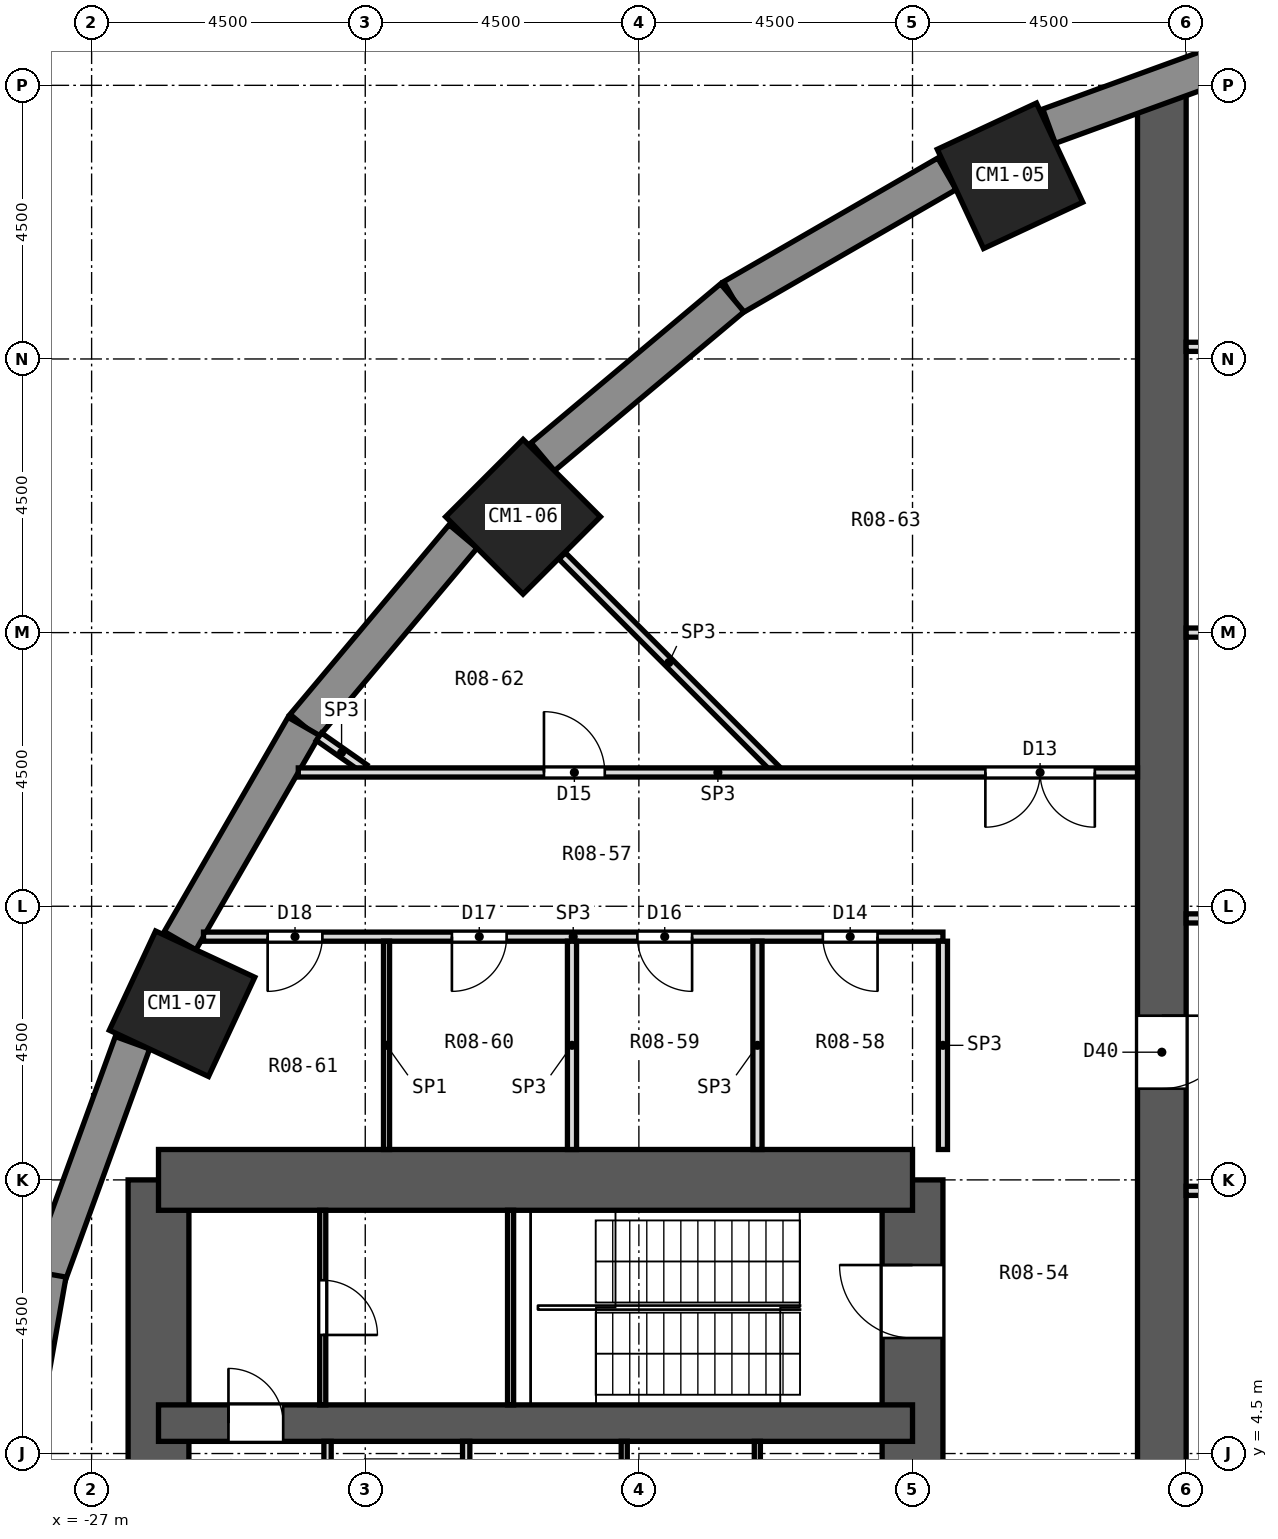
"""IFC4 building model, lengths in metres.
Left out: names, types, materials, properties, quantities, classifications, styles, units other than length and angle.
Written with IfcOpenShell. Run it as: python <this file> out.ifc"""

import sys

from ifc_helpers import new_model, si_unit, direction, frame, frame_2d, origin, origin_2d, place, context, subcontext, project, spatial, rectangle, extrude, element, fill, save


model = new_model("IFC4")
c1 = context("Model", 3, precision=1e-05, world=origin(), true_north=direction((0.0, 1.0)))
c2 = subcontext(c1, "Body", "Model", "MODEL_VIEW")
j1 = project(units=[si_unit("LENGTHUNIT", "METRE"), si_unit("PLANEANGLEUNIT", "RADIAN")], contexts=[c1])
p1 = place(None, origin())
s1 = spatial("IfcSite", under=j1, at=p1, CompositionType="ELEMENT")
p2 = place(p1, origin())
s2 = spatial("IfcBuilding", under=s1, at=p2, CompositionType="ELEMENT")
p3 = place(p2, frame((0.0, 0.0, 21.8)))
s3 = spatial("IfcBuildingStorey", under=s2, at=p3, CompositionType="ELEMENT", Elevation=21.8)
for number, where, z_axis, x_axis in (
    (1, (-11.897, 25.512, 0.0), (0.0, 0.0, 1.0), (-0.423, 0.906, 0.0)),
    (2, (-19.905, 19.905, 0.0), (0.0, 0.0, 1.0), (-0.707, 0.707, 0.0)),
    (3, (-25.512, 11.897, 0.0), (0.0, 0.0, 1.0), (-0.906, 0.423, 0.0)),
):
    element("IfcColumn", number, at=place(p3, frame(where, z_axis=z_axis, x_axis=x_axis)), inside=s3, PredefinedType="COLUMN", context=c2, shape_type="SweptSolid", body=[
        extrude(rectangle(XDim=1.8, YDim=1.8, at=origin_2d()), origin(), (0.0, 0.0, 1.0), 4.5),
    ])
p4 = place(p3, frame((-13.5, -9.0, 0.0), z_axis=(0.0, 0.0, 1.0), x_axis=(0.0, 1.0, 0.0)))
e4 = element("IfcWall", 4, at=p4, inside=s3, PredefinedType="SHEAR", context=c2, shape_type="SweptSolid", body=[
    extrude(rectangle(XDim=18.0, YDim=1.0, at=frame_2d((9.0, 0.0))), origin(), (0.0, 0.0, 1.0), 4.5),
])
p5 = place(p4, frame((15.4, 0.0, 0.0)))
e5 = element("IfcOpeningElement", 5, at=p5, cuts=e4, PredefinedType="OPENING", context=c2, shape_type="SweptSolid", body=[
    extrude(rectangle(XDim=1.2, YDim=2.1, at=frame_2d((0.6, 1.05))), frame((0.0, 0.512, 0.0), z_axis=(0.0, -1.0, 0.0), x_axis=(1.0, 0.0, 0.0)), (0.0, 0.0, 1.0), 1.024),
])
p6 = place(p4, frame((1.4, 0.0, 0.0)))
e6 = element("IfcOpeningElement", 6, at=p6, cuts=e4, PredefinedType="OPENING", context=c2, shape_type="SweptSolid", body=[
    extrude(rectangle(XDim=1.2, YDim=2.1, at=frame_2d((0.6, 1.05))), frame((0.0, 0.512, 0.0), z_axis=(0.0, -1.0, 0.0), x_axis=(1.0, 0.0, 0.0)), (0.0, 0.0, 1.0), 1.024),
])
p7 = place(p4, frame((7.5, 0.0, 0.0)))
e7 = element("IfcOpeningElement", 7, at=p7, cuts=e4, PredefinedType="OPENING", context=c2, shape_type="SweptSolid", body=[
    extrude(rectangle(XDim=3.0, YDim=2.4, at=frame_2d((1.5, 1.2))), frame((0.0, 0.512, 0.0), z_axis=(0.0, -1.0, 0.0), x_axis=(1.0, 0.0, 0.0)), (0.0, 0.0, 1.0), 1.024),
])
p8 = place(p3, frame((-25.9, -9.0, 0.0), z_axis=(0.0, 0.0, 1.0), x_axis=(0.0, 1.0, 0.0)))
e8 = element("IfcWall", 8, at=p8, inside=s3, PredefinedType="SHEAR", context=c2, shape_type="SweptSolid", body=[
    extrude(rectangle(XDim=18.0, YDim=1.0, at=frame_2d((9.0, 0.0))), origin(), (0.0, 0.0, 1.0), 4.5),
])
p9 = place(p3, frame((-13.5, 9.0, 0.0), z_axis=(0.0, 0.0, 1.0), x_axis=(-1.0, 0.0, 0.0)))
e9 = element("IfcWall", 9, at=p9, inside=s3, PredefinedType="SHEAR", context=c2, shape_type="SweptSolid", body=[
    extrude(rectangle(XDim=12.4, YDim=1.0, at=frame_2d((6.2, 0.0))), origin(), (0.0, 0.0, 1.0), 4.5),
])
p10 = place(p3, frame((-13.5, 5.0, 0.0), z_axis=(0.0, 0.0, 1.0), x_axis=(-1.0, 0.0, 0.0)))
e10 = element("IfcWall", 10, at=p10, inside=s3, PredefinedType="SHEAR", context=c2, shape_type="SweptSolid", body=[
    extrude(rectangle(XDim=12.4, YDim=0.6, at=frame_2d((6.2, 0.0))), origin(), (0.0, 0.0, 1.0), 4.5),
])
p11 = place(p10, frame((10.35, 0.0, 0.0)))
e11 = element("IfcOpeningElement", 11, at=p11, cuts=e10, PredefinedType="OPENING", context=c2, shape_type="SweptSolid", body=[
    extrude(rectangle(XDim=0.9, YDim=2.1, at=frame_2d((0.45, 1.05))), frame((0.0, 0.312, 0.0), z_axis=(0.0, -1.0, 0.0), x_axis=(1.0, 0.0, 0.0)), (0.0, 0.0, 1.0), 0.624),
])
p12 = place(p3, frame((-9.4, -27.077, 0.0), z_axis=(0.0, 0.0, 1.0), x_axis=(0.0, 1.0, 0.0)))
e12 = element("IfcWall", 12, at=p12, inside=s3, PredefinedType="SHEAR", context=c2, shape_type="SweptSolid", body=[
    extrude(rectangle(XDim=54.154, YDim=0.8, at=frame_2d((27.077, 0.0))), origin(), (0.0, 0.0, 1.0), 4.5),
])
p13 = place(p12, frame((15.377, 0.0, 0.0)))
e13 = element("IfcOpeningElement", 13, at=p13, cuts=e12, PredefinedType="OPENING", context=c2, shape_type="SweptSolid", body=[
    extrude(rectangle(XDim=1.2, YDim=2.1, at=frame_2d((0.6, 1.05))), frame((0.0, 0.412, 0.0), z_axis=(0.0, -1.0, 0.0), x_axis=(1.0, 0.0, 0.0)), (0.0, 0.0, 1.0), 0.824),
])
p14 = place(p12, frame((37.577, 0.0, 0.0)))
e14 = element("IfcOpeningElement", 14, at=p14, cuts=e12, PredefinedType="OPENING", context=c2, shape_type="SweptSolid", body=[
    extrude(rectangle(XDim=1.2, YDim=2.1, at=frame_2d((0.6, 1.05))), frame((0.0, 0.412, 0.0), z_axis=(0.0, -1.0, 0.0), x_axis=(1.0, 0.0, 0.0)), (0.0, 0.0, 1.0), 0.824),
])
p15 = place(p3, frame((-7.431, 27.72, 0.0), z_axis=(0.0, 0.0, 1.0), x_axis=(-0.939683013865, -0.342046536971, 0.0)))
e15 = element("IfcWall", 15, at=p15, inside=s3, PredefinedType="SOLIDWALL", context=c2, shape_type="SweptSolid", body=[
    extrude(rectangle(XDim=4.069, YDim=0.6, at=frame_2d((2.035, 0.0))), origin(), (0.0, 0.0, 1.0), 3.95),
])
p16 = place(p3, frame((-12.934, 25.545, 0.0), z_axis=(0.0, 0.0, 1.0), x_axis=(-0.866011732453, -0.500023678693, 0.0)))
e16 = element("IfcWall", 16, at=p16, inside=s3, PredefinedType="SOLIDWALL", context=c2, shape_type="SweptSolid", body=[
    extrude(rectangle(XDim=4.069, YDim=0.6, at=frame_2d((2.035, 0.0))), origin(), (0.0, 0.0, 1.0), 2.15),
])
for number, where, z_axis, x_axis in (
    (17, (-16.464, 23.506, 0.0), (0.0, 0.0, 1.0), (-0.766, -0.643, 0.0)),
    (18, (-20.891, 19.581, 0.0), (0.0, 0.0, 1.0), (-0.643, -0.766, 0.0)),
):
    element("IfcWall", number, at=place(p3, frame(where, z_axis=z_axis, x_axis=x_axis)), inside=s3, PredefinedType="SOLIDWALL", context=c2, shape_type="SweptSolid", body=[
        extrude(rectangle(XDim=4.069, YDim=0.6, at=frame_2d((2.035, 0.0))), origin(), (0.0, 0.0, 1.0), 2.15),
    ])
p17 = place(p3, frame((-23.51, 16.458, 0.0), z_axis=(0.0, 0.0, 1.0), x_axis=(-0.500023678693, -0.866011732453, 0.0)))
e19 = element("IfcWall", 19, at=p17, inside=s3, PredefinedType="SOLIDWALL", context=c2, shape_type="SweptSolid", body=[
    extrude(rectangle(XDim=4.069, YDim=0.6, at=frame_2d((2.035, 0.0))), origin(), (0.0, 0.0, 1.0), 2.15),
])
p18 = place(p3, frame((-26.328, 11.255, 0.0), z_axis=(0.0, 0.0, 1.0), x_axis=(-0.342034744565, -0.939687306241, 0.0)))
e20 = element("IfcWall", 20, at=p18, inside=s3, PredefinedType="SOLIDWALL", context=c2, shape_type="SweptSolid", body=[
    extrude(rectangle(XDim=4.099, YDim=0.6, at=frame_2d((2.05, 0.0))), origin(), (0.0, 0.0, 1.0), 2.15),
])
p19 = place(p3, frame((-27.716, 7.454, 0.0), z_axis=(0.0, 0.0, 1.0), x_axis=(-0.173673210505, -0.984803338719, 0.0)))
e21 = element("IfcWall", 21, at=p19, inside=s3, PredefinedType="SOLIDWALL", context=c2, shape_type="SweptSolid", body=[
    extrude(rectangle(XDim=4.099, YDim=0.6, at=frame_2d((2.05, 0.0))), origin(), (0.0, 0.0, 1.0), 2.15),
])
p20 = place(p3, frame((-19.262, 19.262, 0.0), z_axis=(0.0, 0.0, 1.0), x_axis=(0.707180580359, -0.707032974311, 0.0)))
e22 = element("IfcWall", 22, at=p20, inside=s3, PredefinedType="PARTITIONING", context=c2, shape_type="SweptSolid", body=[
    extrude(rectangle(XDim=4.962, YDim=0.15, at=frame_2d((2.481, 0.0))), origin(), (0.0, 0.0, 1.0), 3.95),
])
p21 = place(p3, frame((-23.262, 16.288, 0.0), z_axis=(0.0, 0.0, 1.0), x_axis=(0.819168929577, -0.573552320905, 0.0)))
e23 = element("IfcWall", 23, at=p21, inside=s3, PredefinedType="PARTITIONING", context=c2, shape_type="SweptSolid", body=[
    extrude(rectangle(XDim=0.91, YDim=0.15, at=frame_2d((0.455, 0.0))), origin(), (0.0, 0.0, 1.0), 3.95),
])
p22 = place(p3, frame((-9.0, 8.82, 0.0), z_axis=(0.0, 0.0, 1.0), x_axis=(1.0, 0.0, 0.0)))
e24 = element("IfcWall", 24, at=p22, inside=s3, PredefinedType="PARTITIONING", context=c2, shape_type="SweptSolid", body=[
    extrude(rectangle(XDim=18.0, YDim=0.15, at=frame_2d((9.0, 0.0))), origin(), (0.0, 0.0, 1.0), 3.95),
])
p23 = place(p3, frame((-25.16, 13.0, 0.0), z_axis=(0.0, 0.0, 1.0), x_axis=(1.0, 0.0, 0.0)))
e25 = element("IfcWall", 25, at=p23, inside=s3, PredefinedType="PARTITIONING", context=c2, shape_type="SweptSolid", body=[
    extrude(rectangle(XDim=12.16, YDim=0.15, at=frame_2d((6.08, 0.0))), origin(), (0.0, 0.0, 1.0), 3.95),
])
p24 = place(p23, frame((10.185, 0.0, 0.0)))
e26 = element("IfcOpeningElement", 26, at=p24, cuts=e25, PredefinedType="OPENING", context=c2, shape_type="SweptSolid", body=[
    extrude(rectangle(XDim=0.9, YDim=2.1, at=frame_2d((0.45, 1.05))), frame((0.0, 0.087, 0.0), z_axis=(0.0, -1.0, 0.0), x_axis=(1.0, 0.0, 0.0)), (0.0, 0.0, 1.0), 0.174),
])
p25 = place(p23, frame((7.135, 0.0, 0.0)))
e27 = element("IfcOpeningElement", 27, at=p25, cuts=e25, PredefinedType="OPENING", context=c2, shape_type="SweptSolid", body=[
    extrude(rectangle(XDim=0.9, YDim=2.1, at=frame_2d((0.45, 1.05))), frame((0.0, 0.087, 0.0), z_axis=(0.0, -1.0, 0.0), x_axis=(1.0, 0.0, 0.0)), (0.0, 0.0, 1.0), 0.174),
])
p26 = place(p23, frame((4.085, 0.0, 0.0)))
e28 = element("IfcOpeningElement", 28, at=p26, cuts=e25, PredefinedType="OPENING", context=c2, shape_type="SweptSolid", body=[
    extrude(rectangle(XDim=0.9, YDim=2.1, at=frame_2d((0.45, 1.05))), frame((0.0, 0.087, 0.0), z_axis=(0.0, -1.0, 0.0), x_axis=(1.0, 0.0, 0.0)), (0.0, 0.0, 1.0), 0.174),
])
p27 = place(p23, frame((1.055, 0.0, 0.0)))
e29 = element("IfcOpeningElement", 29, at=p27, cuts=e25, PredefinedType="OPENING", context=c2, shape_type="SweptSolid", body=[
    extrude(rectangle(XDim=0.9, YDim=2.1, at=frame_2d((0.45, 1.05))), frame((0.0, 0.087, 0.0), z_axis=(0.0, -1.0, 0.0), x_axis=(1.0, 0.0, 0.0)), (0.0, 0.0, 1.0), 0.174),
])
p28 = place(p3, frame((-9.0, 13.3, 0.0), z_axis=(0.0, 0.0, 1.0), x_axis=(1.0, 0.0, 0.0)))
e30 = element("IfcWall", 30, at=p28, inside=s3, PredefinedType="PARTITIONING", context=c2, shape_type="SweptSolid", body=[
    extrude(rectangle(XDim=9.3, YDim=0.15, at=frame_2d((4.65, 0.0))), origin(), (0.0, 0.0, 1.0), 3.95),
])
p29 = place(p3, frame((-23.601, 15.7, 0.0), z_axis=(0.0, 0.0, 1.0), x_axis=(1.0, 0.0, 0.0)))
e31 = element("IfcWall", 31, at=p29, inside=s3, PredefinedType="PARTITIONING", context=c2, shape_type="SweptSolid", body=[
    extrude(rectangle(XDim=13.801, YDim=0.15, at=frame_2d((6.9, 0.0))), origin(), (0.0, 0.0, 1.0), 3.95),
])
p30 = place(p29, frame((11.299, 0.0, 0.0)))
e32 = element("IfcOpeningElement", 32, at=p30, cuts=e31, PredefinedType="OPENING", context=c2, shape_type="SweptSolid", body=[
    extrude(rectangle(XDim=1.8, YDim=2.1, at=frame_2d((0.9, 1.05))), frame((0.0, 0.087, 0.0), z_axis=(0.0, -1.0, 0.0), x_axis=(1.0, 0.0, 0.0)), (0.0, 0.0, 1.0), 0.174),
])
p31 = place(p29, frame((4.04, 0.0, 0.0)))
e33 = element("IfcOpeningElement", 33, at=p31, cuts=e31, PredefinedType="OPENING", context=c2, shape_type="SweptSolid", body=[
    extrude(rectangle(XDim=1.0, YDim=2.1, at=frame_2d((0.5, 1.05))), frame((0.0, 0.087, 0.0), z_axis=(0.0, -1.0, 0.0), x_axis=(1.0, 0.0, 0.0)), (0.0, 0.0, 1.0), 0.174),
])
for number, where, z_axis, x_axis in (
    (34, (-9.0, 18.0, 0.0), (0.0, 0.0, 1.0), (1.0, 0.0, 0.0)),
    (35, (-9.0, 22.7, 0.0), (0.0, 0.0, 1.0), (1.0, 0.0, 0.0)),
):
    element("IfcWall", number, at=place(p3, frame(where, z_axis=z_axis, x_axis=x_axis)), inside=s3, PredefinedType="PARTITIONING", context=c2, shape_type="SweptSolid", body=[
        extrude(rectangle(XDim=9.225, YDim=0.15, at=frame_2d((4.613, 0.0))), origin(), (0.0, 0.0, 1.0), 3.95),
    ])
for number, where, z_axis, x_axis in (
    (36, (-13.0, 9.5, 0.0), (0.0, 0.0, 1.0), (0.0, 1.0, 0.0)),
    (37, (-16.05, 9.5, 0.0), (0.0, 0.0, 1.0), (0.0, 1.0, 0.0)),
    (38, (-19.1, 9.5, 0.0), (0.0, 0.0, 1.0), (0.0, 1.0, 0.0)),
):
    element("IfcWall", number, at=place(p3, frame(where, z_axis=z_axis, x_axis=x_axis)), inside=s3, PredefinedType="PARTITIONING", context=c2, shape_type="SweptSolid", body=[
        extrude(rectangle(XDim=3.425, YDim=0.15, at=frame_2d((1.712, 0.0))), origin(), (0.0, 0.0, 1.0), 3.95),
    ])
p32 = place(p3, frame((-22.15, 9.5, 0.0), z_axis=(0.0, 0.0, 1.0), x_axis=(0.0, 1.0, 0.0)))
e39 = element("IfcWall", 39, at=p32, inside=s3, PredefinedType="PARTITIONING", context=c2, shape_type="SweptSolid", body=[
    extrude(rectangle(XDim=3.425, YDim=0.1, at=frame_2d((1.712, 0.0))), origin(), (0.0, 0.0, 1.0), 3.95),
])
for number, where, z_axis, x_axis in (
    (40, (-16.052, 2.3, 0.0), (0.0, 0.0, 1.0), (0.0, 1.0, 0.0)),
    (41, (-18.241, 2.3, 0.0), (0.0, 0.0, 1.0), (0.0, 1.0, 0.0)),
):
    element("IfcWall", number, at=place(p3, frame(where, z_axis=z_axis, x_axis=x_axis)), inside=s3, PredefinedType="PARTITIONING", context=c2, shape_type="SweptSolid", body=[
        extrude(rectangle(XDim=2.4, YDim=0.1, at=frame_2d((1.2, 0.0))), origin(), (0.0, 0.0, 1.0), 3.95),
    ])
for number, where, z_axis, x_axis in (
    (42, (-20.84, 2.3, 0.0), (0.0, 0.0, 1.0), (0.0, 1.0, 0.0)),
    (43, (-23.12, 2.3, 0.0), (0.0, 0.0, 1.0), (0.0, 1.0, 0.0)),
):
    element("IfcWall", number, at=place(p3, frame(where, z_axis=z_axis, x_axis=x_axis)), inside=s3, PredefinedType="PARTITIONING", context=c2, shape_type="SweptSolid", body=[
        extrude(rectangle(XDim=2.4, YDim=0.12, at=frame_2d((1.2, 0.0))), origin(), (0.0, 0.0, 1.0), 3.95),
    ])
p33 = place(p3, frame((-20.11, 5.3, 0.0), z_axis=(0.0, 0.0, 1.0), x_axis=(0.0, 1.0, 0.0)))
e44 = element("IfcWall", 44, at=p33, inside=s3, PredefinedType="PARTITIONING", context=c2, shape_type="SweptSolid", body=[
    extrude(rectangle(XDim=3.2, YDim=0.1, at=frame_2d((1.6, 0.0))), origin(), (0.0, 0.0, 1.0), 3.95),
])
p34 = place(p3, frame((-23.199, 5.3, 0.0), z_axis=(0.0, 0.0, 1.0), x_axis=(0.0, 1.0, 0.0)))
e45 = element("IfcWall", 45, at=p34, inside=s3, PredefinedType="PARTITIONING", context=c2, shape_type="SweptSolid", body=[
    extrude(rectangle(XDim=3.2, YDim=0.1, at=frame_2d((1.6, 0.0))), origin(), (0.0, 0.0, 1.0), 3.95),
])
p35 = place(p34, frame((1.15, 0.0, 0.0)))
e46 = element("IfcOpeningElement", 46, at=p35, cuts=e45, PredefinedType="OPENING", context=c2, shape_type="SweptSolid", body=[
    extrude(rectangle(XDim=0.9, YDim=2.1, at=frame_2d((0.45, 1.05))), frame((0.0, 0.062, 0.0), z_axis=(0.0, -1.0, 0.0), x_axis=(1.0, 0.0, 0.0)), (0.0, 0.0, 1.0), 0.124),
])
p36 = place(p30, frame((1.8, 0.0, 0.0), z_axis=(0.0, 0.0, 1.0), x_axis=(-1.0, 0.0, 0.0)))
e47 = element("IfcDoor", 47, at=p36, inside=s3, OperationType="DOUBLE_DOOR_SINGLE_SWING", PredefinedType="DOOR", context=c2, shape_type="SweptSolid", body=[
    extrude(rectangle(XDim=1.8, YDim=2.1, at=frame_2d((0.9, 1.05))), frame((0.0, 0.025, 0.0), z_axis=(0.0, -1.0, 0.0), x_axis=(1.0, 0.0, 0.0)), (0.0, 0.0, 1.0), 0.05),
])
fill(e32, e47)
p37 = place(p24, frame((0.9, 0.0, 0.0), z_axis=(0.0, 0.0, 1.0), x_axis=(-1.0, 0.0, 0.0)))
e48 = element("IfcDoor", 48, at=p37, inside=s3, OperationType="SINGLE_SWING_LEFT", PredefinedType="DOOR", context=c2, shape_type="SweptSolid", body=[
    extrude(rectangle(XDim=0.9, YDim=2.1, at=frame_2d((0.45, 1.05))), frame((0.0, 0.025, 0.0), z_axis=(0.0, -1.0, 0.0), x_axis=(1.0, 0.0, 0.0)), (0.0, 0.0, 1.0), 0.05),
])
fill(e26, e48)
p38 = place(p31, origin())
e49 = element("IfcDoor", 49, at=p38, inside=s3, OperationType="SINGLE_SWING_LEFT", PredefinedType="DOOR", context=c2, shape_type="SweptSolid", body=[
    extrude(rectangle(XDim=1.0, YDim=2.1, at=frame_2d((0.5, 1.05))), frame((0.0, 0.025, 0.0), z_axis=(0.0, -1.0, 0.0), x_axis=(1.0, 0.0, 0.0)), (0.0, 0.0, 1.0), 0.05),
])
fill(e33, e49)
p39 = place(p25, frame((0.9, 0.0, 0.0), z_axis=(0.0, 0.0, 1.0), x_axis=(-1.0, 0.0, 0.0)))
e50 = element("IfcDoor", 50, at=p39, inside=s3, OperationType="SINGLE_SWING_LEFT", PredefinedType="DOOR", context=c2, shape_type="SweptSolid", body=[
    extrude(rectangle(XDim=0.9, YDim=2.1, at=frame_2d((0.45, 1.05))), frame((0.0, 0.025, 0.0), z_axis=(0.0, -1.0, 0.0), x_axis=(1.0, 0.0, 0.0)), (0.0, 0.0, 1.0), 0.05),
])
fill(e27, e50)
p40 = place(p26, frame((0.9, 0.0, 0.0), z_axis=(0.0, 0.0, 1.0), x_axis=(-1.0, 0.0, 0.0)))
e51 = element("IfcDoor", 51, at=p40, inside=s3, OperationType="SINGLE_SWING_RIGHT", PredefinedType="DOOR", context=c2, shape_type="SweptSolid", body=[
    extrude(rectangle(XDim=0.9, YDim=2.1, at=frame_2d((0.45, 1.05))), frame((0.0, 0.025, 0.0), z_axis=(0.0, -1.0, 0.0), x_axis=(1.0, 0.0, 0.0)), (0.0, 0.0, 1.0), 0.05),
])
fill(e28, e51)
p41 = place(p27, frame((0.9, 0.0, 0.0), z_axis=(0.0, 0.0, 1.0), x_axis=(-1.0, 0.0, 0.0)))
e52 = element("IfcDoor", 52, at=p41, inside=s3, OperationType="SINGLE_SWING_RIGHT", PredefinedType="DOOR", context=c2, shape_type="SweptSolid", body=[
    extrude(rectangle(XDim=0.9, YDim=2.1, at=frame_2d((0.45, 1.05))), frame((0.0, 0.025, 0.0), z_axis=(0.0, -1.0, 0.0), x_axis=(1.0, 0.0, 0.0)), (0.0, 0.0, 1.0), 0.05),
])
fill(e29, e52)
p42 = place(p14, frame((1.2, 0.0, 0.0), z_axis=(0.0, 0.0, 1.0), x_axis=(-1.0, 0.0, 0.0)))
e53 = element("IfcDoor", 53, at=p42, inside=s3, OperationType="SINGLE_SWING_LEFT", PredefinedType="DOOR", context=c2, shape_type="SweptSolid", body=[
    extrude(rectangle(XDim=1.2, YDim=2.1, at=frame_2d((0.6, 1.05))), frame((0.0, 0.025, 0.0), z_axis=(0.0, -1.0, 0.0), x_axis=(1.0, 0.0, 0.0)), (0.0, 0.0, 1.0), 0.05),
])
fill(e14, e53)
p43 = place(p35, frame((0.9, 0.0, 0.0), z_axis=(0.0, 0.0, 1.0), x_axis=(-1.0, 0.0, 0.0)))
e54 = element("IfcDoor", 54, at=p43, inside=s3, OperationType="SINGLE_SWING_RIGHT", PredefinedType="DOOR", context=c2, shape_type="SweptSolid", body=[
    extrude(rectangle(XDim=0.9, YDim=2.1, at=frame_2d((0.45, 1.05))), frame((0.0, 0.025, 0.0), z_axis=(0.0, -1.0, 0.0), x_axis=(1.0, 0.0, 0.0)), (0.0, 0.0, 1.0), 0.05),
])
fill(e46, e54)
p44 = place(p11, frame((0.9, 0.0, 0.0), z_axis=(0.0, 0.0, 1.0), x_axis=(-1.0, 0.0, 0.0)))
e55 = element("IfcDoor", 55, at=p44, inside=s3, OperationType="SINGLE_SWING_LEFT", PredefinedType="DOOR", context=c2, shape_type="SweptSolid", body=[
    extrude(rectangle(XDim=0.9, YDim=2.1, at=frame_2d((0.45, 1.05))), frame((0.0, 0.025, 0.0), z_axis=(0.0, -1.0, 0.0), x_axis=(1.0, 0.0, 0.0)), (0.0, 0.0, 1.0), 0.05),
])
fill(e11, e55)
p45 = place(p5, origin())
e56 = element("IfcDoor", 56, at=p45, inside=s3, OperationType="SINGLE_SWING_RIGHT", PredefinedType="DOOR", context=c2, shape_type="SweptSolid", body=[
    extrude(rectangle(XDim=1.2, YDim=2.1, at=frame_2d((0.6, 1.05))), frame((0.0, 0.025, 0.0), z_axis=(0.0, -1.0, 0.0), x_axis=(1.0, 0.0, 0.0)), (0.0, 0.0, 1.0), 0.05),
])
fill(e5, e56)
save(model, sys.argv[1])
